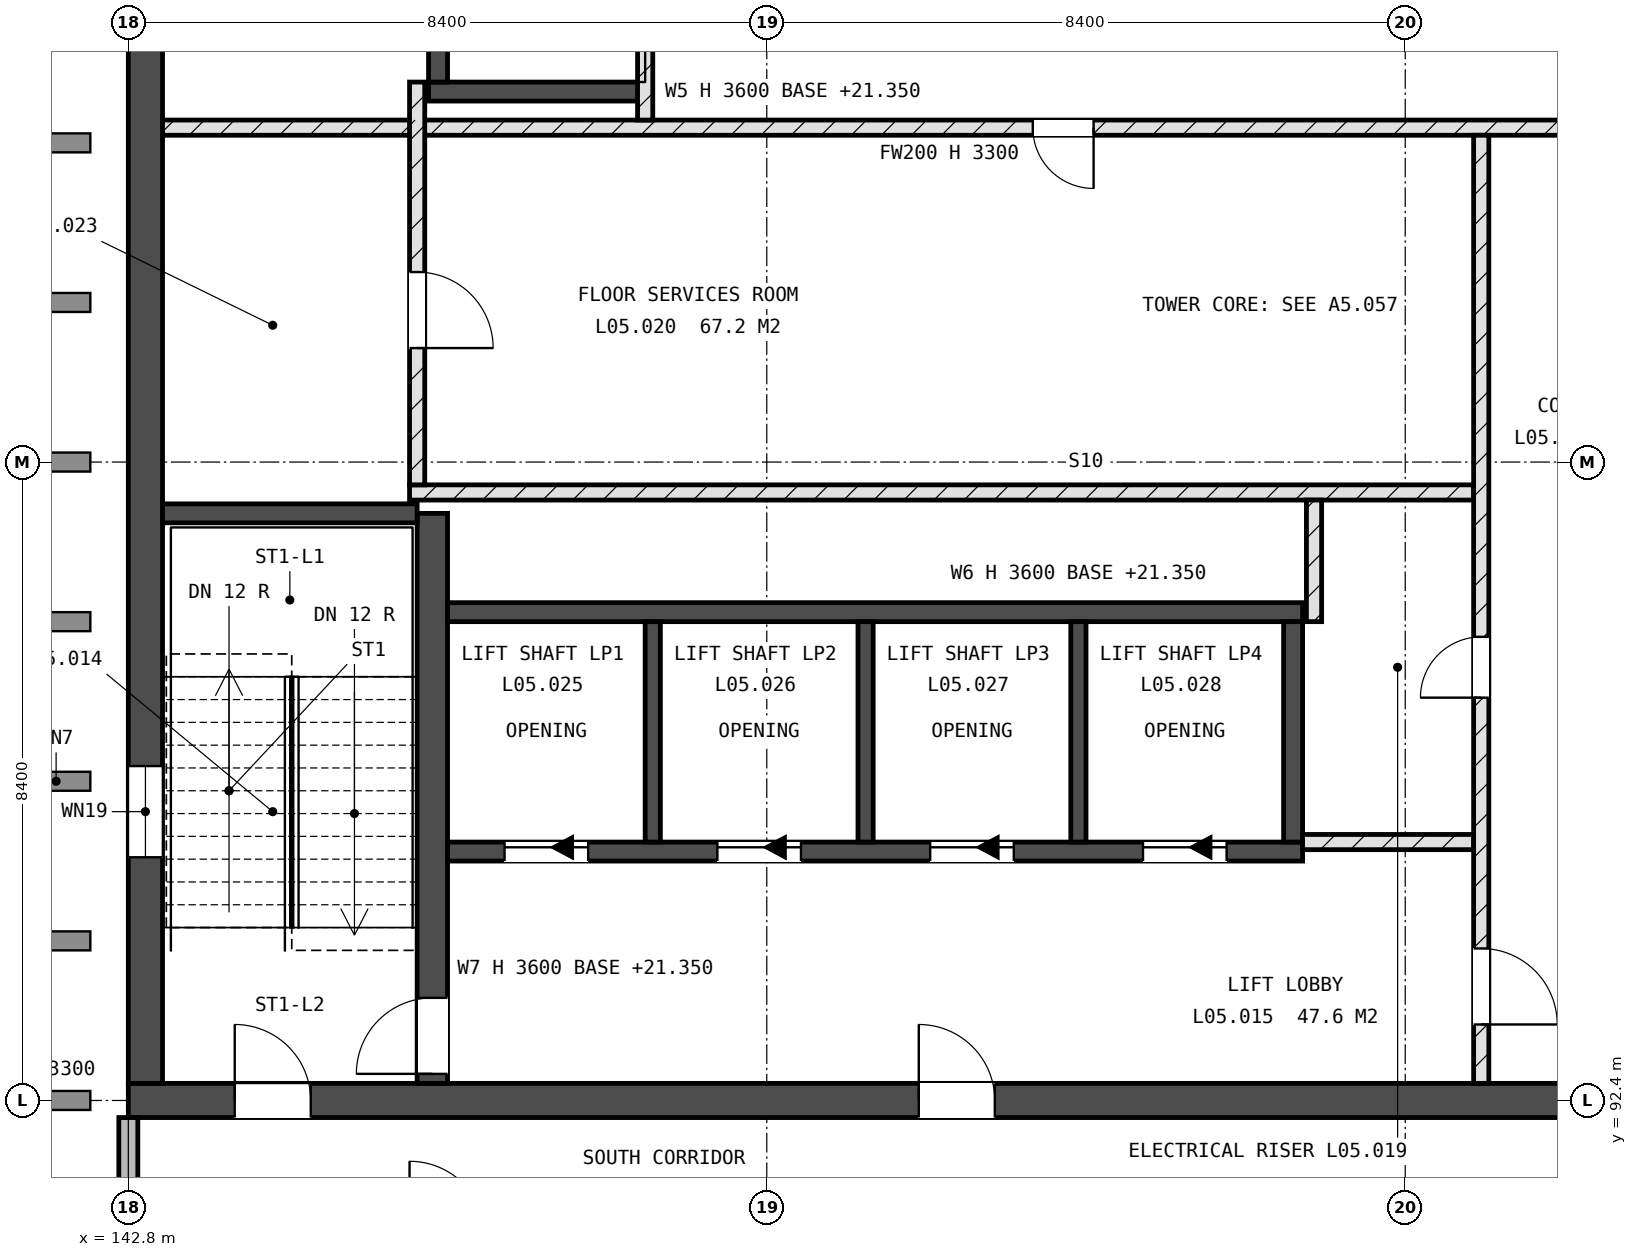
"""IFC4 building model, lengths in metres.
Left out: names, types, materials, properties, quantities, classifications, styles, units other than length and angle.
Written with IfcOpenShell. Run it as: python <this file> out.ifc"""

import sys

from ifc_helpers import new_model, si_unit, direction, frame, frame_2d, origin, place, context, subcontext, project, spatial, rectangle, extrude, element, fill, save


model = new_model("IFC4")
c1 = context("Model", 3, precision=1e-05, world=origin(), true_north=direction((0.0, 1.0)))
c2 = subcontext(c1, "Body", "Model", "MODEL_VIEW")
j1 = project(units=[si_unit("LENGTHUNIT", "METRE"), si_unit("PLANEANGLEUNIT", "RADIAN")], contexts=[c1])
p1 = place(None, origin())
s1 = spatial("IfcSite", under=j1, at=p1, CompositionType="ELEMENT")
p2 = place(p1, origin())
s2 = spatial("IfcBuilding", under=s1, at=p2, CompositionType="ELEMENT")
p3 = place(p2, frame((0.0, 0.0, 21.6)))
s3 = spatial("IfcBuildingStorey", under=s2, at=p3, CompositionType="ELEMENT", Elevation=21.6)
p4 = place(p3, frame((142.8, 92.4, -0.25), z_axis=(0.0, 0.0, 1.0), x_axis=(1.0, 0.0, 0.0)))
e1 = element("IfcWall", 1, at=p4, inside=s3, PredefinedType="SHEAR", context=c2, shape_type="SweptSolid", body=[
    extrude(rectangle(XDim=25.2, YDim=0.45, at=frame_2d((12.6, 0.0))), origin(), (0.0, 0.0, 1.0), 3.6),
])
p5 = place(p4, frame((1.4, 0.0, 0.25)))
e2 = element("IfcOpeningElement", 2, at=p5, cuts=e1, PredefinedType="OPENING", context=c2, shape_type="SweptSolid", body=[
    extrude(rectangle(XDim=1.0, YDim=2.1, at=frame_2d((0.5, 1.05))), frame((0.0, 0.235, 0.0), z_axis=(0.0, -1.0, 0.0), x_axis=(1.0, 0.0, 0.0)), (0.0, 0.0, 1.0), 0.47),
])
p6 = place(p4, frame((19.1, 0.0, 0.25)))
e3 = element("IfcOpeningElement", 3, at=p6, cuts=e1, PredefinedType="OPENING", context=c2, shape_type="SweptSolid", body=[
    extrude(rectangle(XDim=1.0, YDim=2.1, at=frame_2d((0.5, 1.05))), frame((0.0, 0.235, 0.0), z_axis=(0.0, -1.0, 0.0), x_axis=(1.0, 0.0, 0.0)), (0.0, 0.0, 1.0), 0.47),
])
p7 = place(p4, frame((10.4, 0.0, 0.25)))
e4 = element("IfcOpeningElement", 4, at=p7, cuts=e1, PredefinedType="OPENING", context=c2, shape_type="SweptSolid", body=[
    extrude(rectangle(XDim=1.0, YDim=2.1, at=frame_2d((0.5, 1.05))), frame((0.0, 0.235, 0.0), z_axis=(0.0, -1.0, 0.0), x_axis=(1.0, 0.0, 0.0)), (0.0, 0.0, 1.0), 0.47),
])
p8 = place(p3, frame((143.025, 92.625, -0.25), z_axis=(0.0, 0.0, 1.0), x_axis=(0.0, 1.0, 0.0)))
e5 = element("IfcWall", 5, at=p8, inside=s3, PredefinedType="SHEAR", context=c2, shape_type="SweptSolid", body=[
    extrude(rectangle(XDim=16.35, YDim=0.45, at=frame_2d((8.175, 0.0))), origin(), (0.0, 0.0, 1.0), 3.6),
])
p9 = place(p8, frame((2.975, 0.0, 1.85)))
e6 = element("IfcOpeningElement", 6, at=p9, cuts=e5, PredefinedType="OPENING", context=c2, shape_type="SweptSolid", body=[
    extrude(rectangle(XDim=1.2, YDim=0.9, at=frame_2d((0.6, 0.45))), frame((0.0, 0.235, 0.0), z_axis=(0.0, -1.0, 0.0), x_axis=(1.0, 0.0, 0.0)), (0.0, 0.0, 1.0), 0.47),
])
p10 = place(p3, frame((146.8, 92.625, -0.25), z_axis=(0.0, 0.0, 1.0), x_axis=(0.0, 1.0, 0.0)))
e7 = element("IfcWall", 7, at=p10, inside=s3, PredefinedType="SHEAR", context=c2, shape_type="SweptSolid", body=[
    extrude(rectangle(XDim=7.5, YDim=0.4, at=frame_2d((3.75, 0.0))), origin(), (0.0, 0.0, 1.0), 3.6),
])
p11 = place(p10, frame((0.125, 0.0, 0.25)))
e8 = element("IfcOpeningElement", 8, at=p11, cuts=e7, PredefinedType="OPENING", context=c2, shape_type="SweptSolid", body=[
    extrude(rectangle(XDim=1.0, YDim=2.1, at=frame_2d((0.5, 1.05))), frame((0.0, 0.21, 0.0), z_axis=(0.0, -1.0, 0.0), x_axis=(1.0, 0.0, 0.0)), (0.0, 0.0, 1.0), 0.42),
])
p12 = place(p3, frame((143.25, 100.125, -0.25), z_axis=(0.0, 0.0, 1.0), x_axis=(1.0, 0.0, 0.0)))
e9 = element("IfcWall", 9, at=p12, inside=s3, PredefinedType="SHEAR", context=c2, shape_type="SweptSolid", body=[
    extrude(rectangle(XDim=3.35, YDim=0.25, at=frame_2d((1.675, 0.0))), origin(), (0.0, 0.0, 1.0), 3.6),
])
p13 = place(p3, frame((147.0, 95.675, -0.25), z_axis=(0.0, 0.0, 1.0), x_axis=(1.0, 0.0, 0.0)))
e10 = element("IfcWall", 10, at=p13, inside=s3, PredefinedType="SHEAR", context=c2, shape_type="SweptSolid", body=[
    extrude(rectangle(XDim=11.25, YDim=0.25, at=frame_2d((5.625, 0.0))), origin(), (0.0, 0.0, 1.0), 3.6),
])
p14 = place(p13, frame((0.75, 0.0, 0.25)))
e11 = element("IfcOpeningElement", 11, at=p14, cuts=e10, PredefinedType="OPENING", context=c2, shape_type="SweptSolid", body=[
    extrude(rectangle(XDim=1.1, YDim=2.1, at=frame_2d((0.55, 1.05))), frame((0.0, 0.135, 0.0), z_axis=(0.0, -1.0, 0.0), x_axis=(1.0, 0.0, 0.0)), (0.0, 0.0, 1.0), 0.27),
])
p15 = place(p13, frame((3.55, 0.0, 0.25)))
e12 = element("IfcOpeningElement", 12, at=p15, cuts=e10, PredefinedType="OPENING", context=c2, shape_type="SweptSolid", body=[
    extrude(rectangle(XDim=1.1, YDim=2.1, at=frame_2d((0.55, 1.05))), frame((0.0, 0.135, 0.0), z_axis=(0.0, -1.0, 0.0), x_axis=(1.0, 0.0, 0.0)), (0.0, 0.0, 1.0), 0.27),
])
p16 = place(p13, frame((6.35, 0.0, 0.25)))
e13 = element("IfcOpeningElement", 13, at=p16, cuts=e10, PredefinedType="OPENING", context=c2, shape_type="SweptSolid", body=[
    extrude(rectangle(XDim=1.1, YDim=2.1, at=frame_2d((0.55, 1.05))), frame((0.0, 0.135, 0.0), z_axis=(0.0, -1.0, 0.0), x_axis=(1.0, 0.0, 0.0)), (0.0, 0.0, 1.0), 0.27),
])
p17 = place(p13, frame((9.15, 0.0, 0.25)))
e14 = element("IfcOpeningElement", 14, at=p17, cuts=e10, PredefinedType="OPENING", context=c2, shape_type="SweptSolid", body=[
    extrude(rectangle(XDim=1.1, YDim=2.1, at=frame_2d((0.55, 1.05))), frame((0.0, 0.135, 0.0), z_axis=(0.0, -1.0, 0.0), x_axis=(1.0, 0.0, 0.0)), (0.0, 0.0, 1.0), 0.27),
])
p18 = place(p3, frame((147.0, 98.825, -0.25), z_axis=(0.0, 0.0, 1.0), x_axis=(1.0, 0.0, 0.0)))
e15 = element("IfcWall", 15, at=p18, inside=s3, PredefinedType="SHEAR", context=c2, shape_type="SweptSolid", body=[
    extrude(rectangle(XDim=11.25, YDim=0.25, at=frame_2d((5.625, 0.0))), origin(), (0.0, 0.0, 1.0), 3.6),
])
p19 = place(p3, frame((158.125, 95.8, -0.25), z_axis=(0.0, 0.0, 1.0), x_axis=(0.0, 1.0, 0.0)))
e16 = element("IfcWall", 16, at=p19, inside=s3, PredefinedType="SHEAR", context=c2, shape_type="SweptSolid", body=[
    extrude(rectangle(XDim=2.9, YDim=0.25, at=frame_2d((1.45, 0.0))), origin(), (0.0, 0.0, 1.0), 3.6),
])
for number, where, z_axis, x_axis in (
    (17, (149.7, 95.8, -0.25), (0.0, 0.0, 1.0), (0.0, 1.0, 0.0)),
    (18, (152.5, 95.8, -0.25), (0.0, 0.0, 1.0), (0.0, 1.0, 0.0)),
    (19, (155.3, 95.8, -0.25), (0.0, 0.0, 1.0), (0.0, 1.0, 0.0)),
):
    element("IfcWall", number, at=place(p3, frame(where, z_axis=z_axis, x_axis=x_axis)), inside=s3, PredefinedType="SHEAR", context=c2, shape_type="SweptSolid", body=[
        extrude(rectangle(XDim=2.9, YDim=0.2, at=frame_2d((1.45, 0.0))), origin(), (0.0, 0.0, 1.0), 3.6),
    ])
p20 = place(p3, frame((146.75, 105.675, -0.25), z_axis=(0.0, 0.0, 1.0), x_axis=(1.0, 0.0, 0.0)))
e20 = element("IfcWall", 20, at=p20, inside=s3, PredefinedType="SHEAR", context=c2, shape_type="SweptSolid", body=[
    extrude(rectangle(XDim=2.85, YDim=0.25, at=frame_2d((1.425, 0.0))), origin(), (0.0, 0.0, 1.0), 3.6),
])
p21 = place(p3, frame((146.875, 105.8, -0.25), z_axis=(0.0, 0.0, 1.0), x_axis=(0.0, 1.0, 0.0)))
e21 = element("IfcWall", 21, at=p21, inside=s3, PredefinedType="SHEAR", context=c2, shape_type="SweptSolid", body=[
    extrude(rectangle(XDim=2.9, YDim=0.25, at=frame_2d((1.45, 0.0))), origin(), (0.0, 0.0, 1.0), 3.6),
])
p22 = place(p3, frame((142.8, 84.5, 0.0), z_axis=(0.0, 0.0, 1.0), x_axis=(0.0, 1.0, 0.0)))
e22 = element("IfcWall", 22, at=p22, inside=s3, PredefinedType="STANDARD", context=c2, shape_type="SweptSolid", body=[
    extrude(rectangle(XDim=7.675, YDim=0.25, at=frame_2d((3.837, 0.0))), origin(), (0.0, 0.0, 1.0), 3.3),
])
p23 = place(p22, frame((2.2, 0.0, 2.1)))
e23 = element("IfcOpeningElement", 23, at=p23, cuts=e22, PredefinedType="OPENING", context=c2, shape_type="SweptSolid", body=[
    extrude(rectangle(XDim=0.9, YDim=0.6, at=frame_2d((0.45, 0.3))), frame((0.0, 0.135, 0.0), z_axis=(0.0, -1.0, 0.0), x_axis=(1.0, 0.0, 0.0)), (0.0, 0.0, 1.0), 0.27),
])
p24 = place(p3, frame((158.25, 95.8, 0.0), z_axis=(0.0, 0.0, 1.0), x_axis=(1.0, 0.0, 0.0)))
e24 = element("IfcWall", 24, at=p24, inside=s3, PredefinedType="SOLIDWALL", context=c2, shape_type="SweptSolid", body=[
    extrude(rectangle(XDim=2.25, YDim=0.2, at=frame_2d((1.125, 0.0))), origin(), (0.0, 0.0, 1.0), 3.3),
])
p25 = place(p3, frame((146.5, 100.4, 0.0), z_axis=(0.0, 0.0, 1.0), x_axis=(1.0, 0.0, 0.0)))
e25 = element("IfcWall", 25, at=p25, inside=s3, PredefinedType="SOLIDWALL", context=c2, shape_type="SweptSolid", body=[
    extrude(rectangle(XDim=14.0, YDim=0.2, at=frame_2d((7.0, 0.0))), origin(), (0.0, 0.0, 1.0), 3.3),
])
p26 = place(p3, frame((143.25, 105.2, 0.0), z_axis=(0.0, 0.0, 1.0), x_axis=(1.0, 0.0, 0.0)))
e26 = element("IfcWall", 26, at=p26, inside=s3, PredefinedType="SOLIDWALL", context=c2, shape_type="SweptSolid", body=[
    extrude(rectangle(XDim=20.7, YDim=0.2, at=frame_2d((10.35, 0.0))), origin(), (0.0, 0.0, 1.0), 3.3),
])
p27 = place(p26, frame((11.45, 0.0, 0.0)))
e27 = element("IfcOpeningElement", 27, at=p27, cuts=e26, PredefinedType="OPENING", context=c2, shape_type="SweptSolid", body=[
    extrude(rectangle(XDim=0.8, YDim=2.1, at=frame_2d((0.4, 1.05))), frame((0.0, 0.11, 0.0), z_axis=(0.0, -1.0, 0.0), x_axis=(1.0, 0.0, 0.0)), (0.0, 0.0, 1.0), 0.22),
])
p28 = place(p26, frame((18.75, 0.0, 0.0)))
e28 = element("IfcOpeningElement", 28, at=p28, cuts=e26, PredefinedType="OPENING", context=c2, shape_type="SweptSolid", body=[
    extrude(rectangle(XDim=1.0, YDim=2.1, at=frame_2d((0.5, 1.05))), frame((0.0, 0.11, 0.0), z_axis=(0.0, -1.0, 0.0), x_axis=(1.0, 0.0, 0.0)), (0.0, 0.0, 1.0), 0.22),
])
p29 = place(p3, frame((146.6, 100.5, 0.0), z_axis=(0.0, 0.0, 1.0), x_axis=(0.0, 1.0, 0.0)))
e29 = element("IfcWall", 29, at=p29, inside=s3, PredefinedType="SOLIDWALL", context=c2, shape_type="SweptSolid", body=[
    extrude(rectangle(XDim=5.3, YDim=0.2, at=frame_2d((2.65, 0.0))), origin(), (0.0, 0.0, 1.0), 3.3),
])
p30 = place(p29, frame((1.8, 0.0, 0.0)))
e30 = element("IfcOpeningElement", 30, at=p30, cuts=e29, PredefinedType="OPENING", context=c2, shape_type="SweptSolid", body=[
    extrude(rectangle(XDim=1.0, YDim=2.1, at=frame_2d((0.5, 1.05))), frame((0.0, 0.11, 0.0), z_axis=(0.0, -1.0, 0.0), x_axis=(1.0, 0.0, 0.0)), (0.0, 0.0, 1.0), 0.22),
])
p31 = place(p3, frame((149.6, 105.3, 0.0), z_axis=(0.0, 0.0, 1.0), x_axis=(0.0, 1.0, 0.0)))
e31 = element("IfcWall", 31, at=p31, inside=s3, PredefinedType="SOLIDWALL", context=c2, shape_type="SweptSolid", body=[
    extrude(rectangle(XDim=3.675, YDim=0.2, at=frame_2d((1.837, 0.0))), origin(), (0.0, 0.0, 1.0), 3.3),
])
p32 = place(p31, frame((1.4, 0.0, 0.0)))
e32 = element("IfcOpeningElement", 32, at=p32, cuts=e31, PredefinedType="OPENING", context=c2, shape_type="SweptSolid", body=[
    extrude(rectangle(XDim=1.1, YDim=2.1, at=frame_2d((0.55, 1.05))), frame((0.0, 0.11, 0.0), z_axis=(0.0, -1.0, 0.0), x_axis=(1.0, 0.0, 0.0)), (0.0, 0.0, 1.0), 0.22),
])
p33 = place(p3, frame((158.4, 98.7, 0.0), z_axis=(0.0, 0.0, 1.0), x_axis=(0.0, 1.0, 0.0)))
e33 = element("IfcWall", 33, at=p33, inside=s3, PredefinedType="SOLIDWALL", context=c2, shape_type="SweptSolid", body=[
    extrude(rectangle(XDim=1.6, YDim=0.2, at=frame_2d((0.8, 0.0))), origin(), (0.0, 0.0, 1.0), 3.3),
])
p34 = place(p3, frame((160.6, 92.625, 0.0), z_axis=(0.0, 0.0, 1.0), x_axis=(0.0, 1.0, 0.0)))
e34 = element("IfcWall", 34, at=p34, inside=s3, PredefinedType="SOLIDWALL", context=c2, shape_type="SweptSolid", body=[
    extrude(rectangle(XDim=12.475, YDim=0.2, at=frame_2d((6.238, 0.0))), origin(), (0.0, 0.0, 1.0), 3.3),
])
p35 = place(p34, frame((5.075, 0.0, 0.0)))
e35 = element("IfcOpeningElement", 35, at=p35, cuts=e34, PredefinedType="OPENING", context=c2, shape_type="SweptSolid", body=[
    extrude(rectangle(XDim=0.8, YDim=2.1, at=frame_2d((0.4, 1.05))), frame((0.0, 0.11, 0.0), z_axis=(0.0, -1.0, 0.0), x_axis=(1.0, 0.0, 0.0)), (0.0, 0.0, 1.0), 0.22),
])
p36 = place(p34, frame((0.775, 0.0, 0.0)))
e36 = element("IfcOpeningElement", 36, at=p36, cuts=e34, PredefinedType="OPENING", context=c2, shape_type="SweptSolid", body=[
    extrude(rectangle(XDim=1.0, YDim=2.1, at=frame_2d((0.5, 1.05))), frame((0.0, 0.11, 0.0), z_axis=(0.0, -1.0, 0.0), x_axis=(1.0, 0.0, 0.0)), (0.0, 0.0, 1.0), 0.22),
])
p37 = place(p9, origin())
e37 = element("IfcWindow", 37, at=p37, inside=s3, PartitioningType="SINGLE_PANEL", PredefinedType="WINDOW", context=c2, shape_type="SweptSolid", body=[
    extrude(rectangle(XDim=1.2, YDim=0.9, at=frame_2d((0.6, 0.45))), frame((0.0, 0.03, 0.0), z_axis=(0.0, -1.0, 0.0), x_axis=(1.0, 0.0, 0.0)), (0.0, 0.0, 1.0), 0.06),
])
fill(e6, e37)
p38 = place(p14, origin())
e38 = element("IfcDoor", 38, at=p38, inside=s3, OperationType="SLIDING_TO_LEFT", PredefinedType="DOOR", context=c2, shape_type="SweptSolid", body=[
    extrude(rectangle(XDim=1.1, YDim=2.1, at=frame_2d((0.55, 1.05))), frame((0.0, 0.025, 0.0), z_axis=(0.0, -1.0, 0.0), x_axis=(1.0, 0.0, 0.0)), (0.0, 0.0, 1.0), 0.05),
])
fill(e11, e38)
p39 = place(p15, origin())
e39 = element("IfcDoor", 39, at=p39, inside=s3, OperationType="SLIDING_TO_LEFT", PredefinedType="DOOR", context=c2, shape_type="SweptSolid", body=[
    extrude(rectangle(XDim=1.1, YDim=2.1, at=frame_2d((0.55, 1.05))), frame((0.0, 0.025, 0.0), z_axis=(0.0, -1.0, 0.0), x_axis=(1.0, 0.0, 0.0)), (0.0, 0.0, 1.0), 0.05),
])
fill(e12, e39)
p40 = place(p16, origin())
e40 = element("IfcDoor", 40, at=p40, inside=s3, OperationType="SLIDING_TO_LEFT", PredefinedType="DOOR", context=c2, shape_type="SweptSolid", body=[
    extrude(rectangle(XDim=1.1, YDim=2.1, at=frame_2d((0.55, 1.05))), frame((0.0, 0.025, 0.0), z_axis=(0.0, -1.0, 0.0), x_axis=(1.0, 0.0, 0.0)), (0.0, 0.0, 1.0), 0.05),
])
fill(e13, e40)
p41 = place(p17, origin())
e41 = element("IfcDoor", 41, at=p41, inside=s3, OperationType="SLIDING_TO_LEFT", PredefinedType="DOOR", context=c2, shape_type="SweptSolid", body=[
    extrude(rectangle(XDim=1.1, YDim=2.1, at=frame_2d((0.55, 1.05))), frame((0.0, 0.025, 0.0), z_axis=(0.0, -1.0, 0.0), x_axis=(1.0, 0.0, 0.0)), (0.0, 0.0, 1.0), 0.05),
])
fill(e14, e41)
p42 = place(p5, origin())
e42 = element("IfcDoor", 42, at=p42, inside=s3, OperationType="SINGLE_SWING_RIGHT", PredefinedType="DOOR", context=c2, shape_type="SweptSolid", body=[
    extrude(rectangle(XDim=1.0, YDim=2.1, at=frame_2d((0.5, 1.05))), frame((0.0, 0.025, 0.0), z_axis=(0.0, -1.0, 0.0), x_axis=(1.0, 0.0, 0.0)), (0.0, 0.0, 1.0), 0.05),
])
fill(e2, e42)
p43 = place(p11, origin())
e43 = element("IfcDoor", 43, at=p43, inside=s3, OperationType="SINGLE_SWING_RIGHT", PredefinedType="DOOR", context=c2, shape_type="SweptSolid", body=[
    extrude(rectangle(XDim=1.0, YDim=2.1, at=frame_2d((0.5, 1.05))), frame((0.0, 0.025, 0.0), z_axis=(0.0, -1.0, 0.0), x_axis=(1.0, 0.0, 0.0)), (0.0, 0.0, 1.0), 0.05),
])
fill(e8, e43)
p44 = place(p35, origin())
e44 = element("IfcDoor", 44, at=p44, inside=s3, OperationType="SINGLE_SWING_RIGHT", PredefinedType="DOOR", context=c2, shape_type="SweptSolid", body=[
    extrude(rectangle(XDim=0.8, YDim=2.1, at=frame_2d((0.4, 1.05))), frame((0.0, 0.025, 0.0), z_axis=(0.0, -1.0, 0.0), x_axis=(1.0, 0.0, 0.0)), (0.0, 0.0, 1.0), 0.05),
])
fill(e35, e44)
p45 = place(p27, origin())
e45 = element("IfcDoor", 45, at=p45, inside=s3, OperationType="SINGLE_SWING_RIGHT", PredefinedType="DOOR", context=c2, shape_type="SweptSolid", body=[
    extrude(rectangle(XDim=0.8, YDim=2.1, at=frame_2d((0.4, 1.05))), frame((0.0, 0.025, 0.0), z_axis=(0.0, -1.0, 0.0), x_axis=(1.0, 0.0, 0.0)), (0.0, 0.0, 1.0), 0.05),
])
fill(e27, e45)
p46 = place(p30, origin())
e46 = element("IfcDoor", 46, at=p46, inside=s3, OperationType="SINGLE_SWING_LEFT", PredefinedType="DOOR", context=c2, shape_type="SweptSolid", body=[
    extrude(rectangle(XDim=1.0, YDim=2.1, at=frame_2d((0.5, 1.05))), frame((0.0, 0.025, 0.0), z_axis=(0.0, -1.0, 0.0), x_axis=(1.0, 0.0, 0.0)), (0.0, 0.0, 1.0), 0.05),
])
fill(e30, e46)
p47 = place(p7, origin())
e47 = element("IfcDoor", 47, at=p47, inside=s3, OperationType="SINGLE_SWING_RIGHT", PredefinedType="DOOR", context=c2, shape_type="SweptSolid", body=[
    extrude(rectangle(XDim=1.0, YDim=2.1, at=frame_2d((0.5, 1.05))), frame((0.0, 0.025, 0.0), z_axis=(0.0, -1.0, 0.0), x_axis=(1.0, 0.0, 0.0)), (0.0, 0.0, 1.0), 0.05),
])
fill(e4, e47)
p48 = place(p36, origin())
e48 = element("IfcDoor", 48, at=p48, inside=s3, OperationType="SINGLE_SWING_LEFT", PredefinedType="DOOR", context=c2, shape_type="SweptSolid", body=[
    extrude(rectangle(XDim=1.0, YDim=2.1, at=frame_2d((0.5, 1.05))), frame((0.0, 0.025, 0.0), z_axis=(0.0, -1.0, 0.0), x_axis=(1.0, 0.0, 0.0)), (0.0, 0.0, 1.0), 0.05),
])
fill(e36, e48)
save(model, sys.argv[1])
